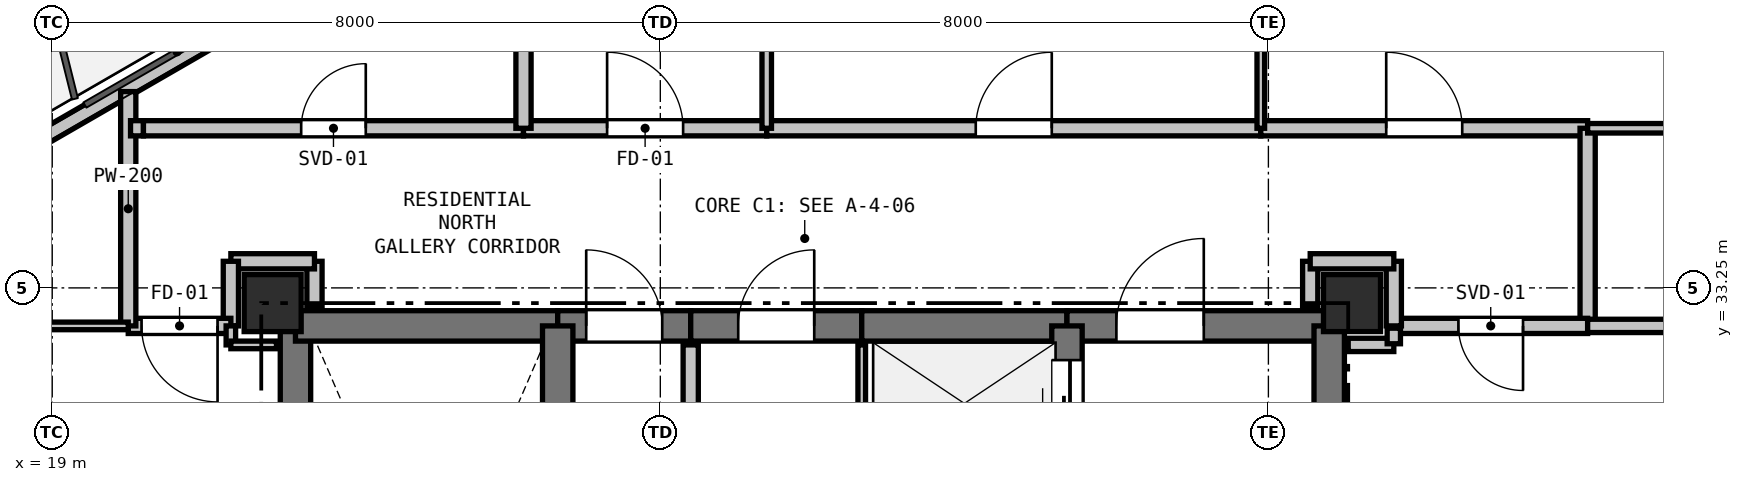
"""IFC4 building model, lengths in metres.
Left out: names, types, materials, properties, quantities, classifications, styles, units other than length and angle.
Written with IfcOpenShell. Run it as: python <this file> out.ifc"""

import sys

from ifc_helpers import new_model, si_unit, direction, frame, frame_2d, origin, origin_2d, place, context, subcontext, project, spatial, rectangle, extrude, element, fill, save


model = new_model("IFC4")
c1 = context("Model", 3, precision=1e-05, world=origin(), true_north=direction((0.0, 1.0)))
c2 = subcontext(c1, "Body", "Model", "MODEL_VIEW")
j1 = project(units=[si_unit("LENGTHUNIT", "METRE"), si_unit("PLANEANGLEUNIT", "RADIAN")], contexts=[c1])
p1 = place(None, origin())
s1 = spatial("IfcSite", under=j1, at=p1, CompositionType="ELEMENT")
p2 = place(p1, origin())
s2 = spatial("IfcBuilding", under=s1, at=p2, CompositionType="ELEMENT")
p3 = place(p2, frame((0.0, 0.0, 167.4)))
s3 = spatial("IfcBuildingStorey", under=s2, at=p3, CompositionType="ELEMENT", Elevation=167.4)
for number, where, z_axis, x_axis in (
    (1, (21.9, 33.05, 0.0), (0.0, 0.0, 1.0), (1.0, 0.0, 0.0)),
    (2, (36.1, 33.05, 0.0), (0.0, 0.0, 1.0), (1.0, 0.0, 0.0)),
):
    element("IfcColumn", number, at=place(p3, frame(where, z_axis=z_axis, x_axis=x_axis)), inside=s3, PredefinedType="COLUMN", context=c2, shape_type="SweptSolid", body=[
        extrude(rectangle(XDim=0.75, YDim=0.75, at=origin_2d()), origin(), (0.0, 0.0, 1.0), 3.3),
    ])
p4 = place(p3, frame((18.58, 35.056, 0.0), z_axis=(0.0, 0.0, 1.0), x_axis=(0.866026169916, 0.499998673018, 0.0)))
e3 = element("IfcWall", 3, at=p4, inside=s3, PredefinedType="PARAPET", context=c2, shape_type="SweptSolid", body=[
    extrude(rectangle(XDim=9.742, YDim=0.2, at=frame_2d((4.871, 0.0))), origin(), (0.0, 0.0, 1.0), 0.2),
])
p5 = place(p3, frame((22.2, 25.4, 0.0), z_axis=(0.0, 0.0, 1.0), x_axis=(0.0, 1.0, 0.0)))
e4 = element("IfcWall", 4, at=p5, inside=s3, PredefinedType="SHEAR", context=c2, shape_type="SweptSolid", body=[
    extrude(rectangle(XDim=7.35, YDim=0.4, at=frame_2d((3.675, 0.0))), origin(), (0.0, 0.0, 1.0), 3.02),
])
p6 = place(p3, frame((22.2, 32.75, 0.0), z_axis=(0.0, 0.0, 1.0), x_axis=(1.0, 0.0, 0.0)))
e5 = element("IfcWall", 5, at=p6, inside=s3, PredefinedType="SHEAR", context=c2, shape_type="SweptSolid", body=[
    extrude(rectangle(XDim=3.45, YDim=0.4, at=frame_2d((1.725, 0.0))), origin(), (0.0, 0.0, 1.0), 3.02),
])
p7 = place(p3, frame((25.65, 32.75, 0.0), z_axis=(0.0, 0.0, 1.0), x_axis=(1.0, 0.0, 0.0)))
e6 = element("IfcWall", 6, at=p7, inside=s3, PredefinedType="SHEAR", context=c2, shape_type="SweptSolid", body=[
    extrude(rectangle(XDim=1.75, YDim=0.4, at=frame_2d((0.875, 0.0))), origin(), (0.0, 0.0, 1.0), 3.02),
])
p8 = place(p7, frame((0.375, 0.0, 0.0)))
e7 = element("IfcOpeningElement", 7, at=p8, cuts=e6, PredefinedType="OPENING", context=c2, shape_type="SweptSolid", body=[
    extrude(rectangle(XDim=1.0, YDim=2.15, at=frame_2d((0.5, 1.075))), frame((0.0, 0.21, 0.0), z_axis=(0.0, -1.0, 0.0), x_axis=(1.0, 0.0, 0.0)), (0.0, 0.0, 1.0), 0.42),
])
p9 = place(p3, frame((27.4, 32.75, 0.0), z_axis=(0.0, 0.0, 1.0), x_axis=(1.0, 0.0, 0.0)))
e8 = element("IfcWall", 8, at=p9, inside=s3, PredefinedType="SHEAR", context=c2, shape_type="SweptSolid", body=[
    extrude(rectangle(XDim=2.25, YDim=0.4, at=frame_2d((1.125, 0.0))), origin(), (0.0, 0.0, 1.0), 3.02),
])
p10 = place(p9, frame((0.625, 0.0, 0.0)))
e9 = element("IfcOpeningElement", 9, at=p10, cuts=e8, PredefinedType="OPENING", context=c2, shape_type="SweptSolid", body=[
    extrude(rectangle(XDim=1.0, YDim=2.15, at=frame_2d((0.5, 1.075))), frame((0.0, 0.21, 0.0), z_axis=(0.0, -1.0, 0.0), x_axis=(1.0, 0.0, 0.0)), (0.0, 0.0, 1.0), 0.42),
])
p11 = place(p3, frame((29.65, 32.75, 0.0), z_axis=(0.0, 0.0, 1.0), x_axis=(1.0, 0.0, 0.0)))
e10 = element("IfcWall", 10, at=p11, inside=s3, PredefinedType="SHEAR", context=c2, shape_type="SweptSolid", body=[
    extrude(rectangle(XDim=2.7, YDim=0.4, at=frame_2d((1.35, 0.0))), origin(), (0.0, 0.0, 1.0), 3.02),
])
p12 = place(p3, frame((32.35, 32.75, 0.0), z_axis=(0.0, 0.0, 1.0), x_axis=(1.0, 0.0, 0.0)))
e11 = element("IfcWall", 11, at=p12, inside=s3, PredefinedType="SHEAR", context=c2, shape_type="SweptSolid", body=[
    extrude(rectangle(XDim=3.45, YDim=0.4, at=frame_2d((1.725, 0.0))), origin(), (0.0, 0.0, 1.0), 3.02),
])
p13 = place(p12, frame((0.65, 0.0, 0.0)))
e12 = element("IfcOpeningElement", 12, at=p13, cuts=e11, PredefinedType="OPENING", context=c2, shape_type="SweptSolid", body=[
    extrude(rectangle(XDim=1.15, YDim=2.15, at=frame_2d((0.575, 1.075))), frame((0.0, 0.21, 0.0), z_axis=(0.0, -1.0, 0.0), x_axis=(1.0, 0.0, 0.0)), (0.0, 0.0, 1.0), 0.42),
])
p14 = place(p3, frame((35.8, 32.75, 0.0), z_axis=(0.0, 0.0, 1.0), x_axis=(0.0, -1.0, 0.0)))
e13 = element("IfcWall", 13, at=p14, inside=s3, PredefinedType="SHEAR", context=c2, shape_type="SweptSolid", body=[
    extrude(rectangle(XDim=4.65, YDim=0.4, at=frame_2d((2.325, 0.0))), origin(), (0.0, 0.0, 1.0), 3.02),
])
p15 = place(p3, frame((25.65, 27.95, 0.0), z_axis=(0.0, 0.0, 1.0), x_axis=(0.0, 1.0, 0.0)))
e14 = element("IfcWall", 14, at=p15, inside=s3, PredefinedType="SHEAR", context=c2, shape_type="SweptSolid", body=[
    extrude(rectangle(XDim=4.8, YDim=0.4, at=frame_2d((2.4, 0.0))), origin(), (0.0, 0.0, 1.0), 3.02),
])
p16 = place(p3, frame((32.35, 30.75, 0.0), z_axis=(0.0, 0.0, 1.0), x_axis=(0.0, 1.0, 0.0)))
e15 = element("IfcWall", 15, at=p16, inside=s3, PredefinedType="SHEAR", context=c2, shape_type="SweptSolid", body=[
    extrude(rectangle(XDim=2.0, YDim=0.4, at=frame_2d((1.0, 0.0))), origin(), (0.0, 0.0, 1.0), 3.02),
])
p17 = place(p16, frame((0.45, 0.0, 0.0)))
e16 = element("IfcOpeningElement", 16, at=p17, cuts=e15, PredefinedType="OPENING", context=c2, shape_type="SweptSolid", body=[
    extrude(rectangle(XDim=1.1, YDim=2.15, at=frame_2d((0.55, 1.075))), frame((0.0, 0.21, 0.0), z_axis=(0.0, -1.0, 0.0), x_axis=(1.0, 0.0, 0.0)), (0.0, 0.0, 1.0), 0.42),
])
p18 = place(p3, frame((29.65, 30.3, 0.0), z_axis=(0.0, 0.0, 1.0), x_axis=(0.0, 1.0, 0.0)))
e17 = element("IfcWall", 17, at=p18, inside=s3, PredefinedType="PARTITIONING", context=c2, shape_type="SweptSolid", body=[
    extrude(rectangle(XDim=2.2, YDim=0.1, at=frame_2d((1.1, 0.0))), origin(), (0.0, 0.0, 1.0), 3.02),
])
p19 = place(p3, frame((27.4, 32.5, 0.0), z_axis=(0.0, 0.0, 1.0), x_axis=(0.0, -1.0, 0.0)))
e18 = element("IfcWall", 18, at=p19, inside=s3, PredefinedType="PARTITIONING", context=c2, shape_type="SweptSolid", body=[
    extrude(rectangle(XDim=4.55, YDim=0.2, at=frame_2d((2.275, 0.0))), origin(), (0.0, 0.0, 1.0), 3.02),
])
p20 = place(p19, frame((1.775, 0.0, 0.0)))
e19 = element("IfcOpeningElement", 19, at=p20, cuts=e18, PredefinedType="OPENING", context=c2, shape_type="SweptSolid", body=[
    extrude(rectangle(XDim=1.0, YDim=2.15, at=frame_2d((0.5, 1.075))), frame((0.0, 0.11, 0.0), z_axis=(0.0, -1.0, 0.0), x_axis=(1.0, 0.0, 0.0)), (0.0, 0.0, 1.0), 0.22),
])
for number, where, z_axis, x_axis in (
    (20, (35.55, 33.6, 0.0), (0.0, 0.0, 1.0), (0.0, -1.0, 0.0)),
    (21, (22.45, 33.0, 0.0), (0.0, 0.0, 1.0), (0.0, 1.0, 0.0)),
):
    element("IfcWall", number, at=place(p3, frame(where, z_axis=z_axis, x_axis=x_axis)), inside=s3, PredefinedType="PARTITIONING", context=c2, shape_type="SweptSolid", body=[
        extrude(rectangle(XDim=0.6, YDim=0.2, at=frame_2d((0.3, 0.0))), origin(), (0.0, 0.0, 1.0), 2.545),
    ])
p21 = place(p3, frame((22.45, 33.6, 0.0), z_axis=(0.0, 0.0, 1.0), x_axis=(-1.0, 0.0, 0.0)))
e22 = element("IfcWall", 22, at=p21, inside=s3, PredefinedType="PARTITIONING", context=c2, shape_type="SweptSolid", body=[
    extrude(rectangle(XDim=1.1, YDim=0.2, at=frame_2d((0.55, 0.0))), origin(), (0.0, 0.0, 1.0), 3.02),
])
p22 = place(p3, frame((21.35, 33.6, 0.0), z_axis=(0.0, 0.0, 1.0), x_axis=(0.0, -1.0, 0.0)))
e23 = element("IfcWall", 23, at=p22, inside=s3, PredefinedType="PARTITIONING", context=c2, shape_type="SweptSolid", body=[
    extrude(rectangle(XDim=0.85, YDim=0.2, at=frame_2d((0.425, 0.0))), origin(), (0.0, 0.0, 1.0), 2.469),
])
p23 = place(p3, frame((21.35, 32.75, 0.0), z_axis=(0.0, 0.0, 1.0), x_axis=(-1.0, 0.0, 0.0)))
e24 = element("IfcWall", 24, at=p23, inside=s3, PredefinedType="PARTITIONING", context=c2, shape_type="SweptSolid", body=[
    extrude(rectangle(XDim=1.35, YDim=0.2, at=frame_2d((0.675, 0.0))), origin(), (0.0, 0.0, 1.0), 2.469),
])
p24 = place(p23, frame((0.175, 0.0, 0.0)))
e25 = element("IfcOpeningElement", 25, at=p24, cuts=e24, PredefinedType="OPENING", context=c2, shape_type="SweptSolid", body=[
    extrude(rectangle(XDim=1.0, YDim=2.15, at=frame_2d((0.5, 1.075))), frame((0.0, 0.11, 0.0), z_axis=(0.0, -1.0, 0.0), x_axis=(1.0, 0.0, 0.0)), (0.0, 0.0, 1.0), 0.22),
])
p25 = place(p3, frame((20.0, 32.75, 0.0), z_axis=(0.0, 0.0, 1.0), x_axis=(0.0, 1.0, 0.0)))
e26 = element("IfcWall", 26, at=p25, inside=s3, PredefinedType="PARTITIONING", context=c2, shape_type="SweptSolid", body=[
    extrude(rectangle(XDim=3.083, YDim=0.2, at=frame_2d((1.541, 0.0))), origin(), (0.0, 0.0, 1.0), 2.365),
])
p26 = place(p3, frame((20.03, 35.35, 0.0), z_axis=(0.0, 0.0, 1.0), x_axis=(1.0, 0.0, 0.0)))
e27 = element("IfcWall", 27, at=p26, inside=s3, PredefinedType="PARTITIONING", context=c2, shape_type="SweptSolid", body=[
    extrude(rectangle(XDim=0.17, YDim=0.2, at=frame_2d((0.085, 0.0))), origin(), (0.0, 0.0, 1.0), 2.365),
])
p27 = place(p3, frame((20.2, 35.35, 0.0), z_axis=(0.0, 0.0, 1.0), x_axis=(1.0, 0.0, 0.0)))
e28 = element("IfcWall", 28, at=p27, inside=s3, PredefinedType="PARTITIONING", context=c2, shape_type="SweptSolid", body=[
    extrude(rectangle(XDim=5.0, YDim=0.2, at=frame_2d((2.5, 0.0))), origin(), (0.0, 0.0, 1.0), 2.365),
])
p28 = place(p27, frame((2.075, 0.0, 0.0)))
e29 = element("IfcOpeningElement", 29, at=p28, cuts=e28, PredefinedType="OPENING", context=c2, shape_type="SweptSolid", body=[
    extrude(rectangle(XDim=0.85, YDim=2.1, at=frame_2d((0.425, 1.05))), frame((0.0, 0.11, 0.0), z_axis=(0.0, -1.0, 0.0), x_axis=(1.0, 0.0, 0.0)), (0.0, 0.0, 1.0), 0.22),
])
p29 = place(p3, frame((25.2, 35.35, 0.0), z_axis=(0.0, 0.0, 1.0), x_axis=(1.0, 0.0, 0.0)))
e30 = element("IfcWall", 30, at=p29, inside=s3, PredefinedType="PARTITIONING", context=c2, shape_type="SweptSolid", body=[
    extrude(rectangle(XDim=3.2, YDim=0.2, at=frame_2d((1.6, 0.0))), origin(), (0.0, 0.0, 1.0), 3.02),
])
p30 = place(p29, frame((1.1, 0.0, 0.0)))
e31 = element("IfcOpeningElement", 31, at=p30, cuts=e30, PredefinedType="OPENING", context=c2, shape_type="SweptSolid", body=[
    extrude(rectangle(XDim=1.0, YDim=2.15, at=frame_2d((0.5, 1.075))), frame((0.0, 0.11, 0.0), z_axis=(0.0, -1.0, 0.0), x_axis=(1.0, 0.0, 0.0)), (0.0, 0.0, 1.0), 0.22),
])
p31 = place(p3, frame((28.4, 35.35, 0.0), z_axis=(0.0, 0.0, 1.0), x_axis=(1.0, 0.0, 0.0)))
e32 = element("IfcWall", 32, at=p31, inside=s3, PredefinedType="PARTITIONING", context=c2, shape_type="SweptSolid", body=[
    extrude(rectangle(XDim=6.5, YDim=0.2, at=frame_2d((3.25, 0.0))), origin(), (0.0, 0.0, 1.0), 3.02),
])
p32 = place(p31, frame((2.75, 0.0, 0.0)))
e33 = element("IfcOpeningElement", 33, at=p32, cuts=e32, PredefinedType="OPENING", context=c2, shape_type="SweptSolid", body=[
    extrude(rectangle(XDim=1.0, YDim=2.15, at=frame_2d((0.5, 1.075))), frame((0.0, 0.11, 0.0), z_axis=(0.0, -1.0, 0.0), x_axis=(1.0, 0.0, 0.0)), (0.0, 0.0, 1.0), 0.22),
])
p33 = place(p3, frame((34.9, 35.35, 0.0), z_axis=(0.0, 0.0, 1.0), x_axis=(1.0, 0.0, 0.0)))
e34 = element("IfcWall", 34, at=p33, inside=s3, PredefinedType="PARTITIONING", context=c2, shape_type="SweptSolid", body=[
    extrude(rectangle(XDim=4.3, YDim=0.2, at=frame_2d((2.15, 0.0))), origin(), (0.0, 0.0, 1.0), 2.469),
])
p34 = place(p33, frame((1.65, 0.0, 0.0)))
e35 = element("IfcOpeningElement", 35, at=p34, cuts=e34, PredefinedType="OPENING", context=c2, shape_type="SweptSolid", body=[
    extrude(rectangle(XDim=1.0, YDim=2.15, at=frame_2d((0.5, 1.075))), frame((0.0, 0.11, 0.0), z_axis=(0.0, -1.0, 0.0), x_axis=(1.0, 0.0, 0.0)), (0.0, 0.0, 1.0), 0.22),
])
p35 = place(p3, frame((39.2, 35.35, 0.0), z_axis=(0.0, 0.0, 1.0), x_axis=(0.0, -1.0, 0.0)))
e36 = element("IfcWall", 36, at=p35, inside=s3, PredefinedType="PARTITIONING", context=c2, shape_type="SweptSolid", body=[
    extrude(rectangle(XDim=2.6, YDim=0.2, at=frame_2d((1.3, 0.0))), origin(), (0.0, 0.0, 1.0), 3.02),
])
p36 = place(p3, frame((39.2, 32.75, 0.0), z_axis=(0.0, 0.0, 1.0), x_axis=(-1.0, 0.0, 0.0)))
e37 = element("IfcWall", 37, at=p36, inside=s3, PredefinedType="PARTITIONING", context=c2, shape_type="SweptSolid", body=[
    extrude(rectangle(XDim=2.55, YDim=0.2, at=frame_2d((1.275, 0.0))), origin(), (0.0, 0.0, 1.0), 3.02),
])
p37 = place(p36, frame((0.85, 0.0, 0.0)))
e38 = element("IfcOpeningElement", 38, at=p37, cuts=e37, PredefinedType="OPENING", context=c2, shape_type="SweptSolid", body=[
    extrude(rectangle(XDim=0.85, YDim=2.1, at=frame_2d((0.425, 1.05))), frame((0.0, 0.11, 0.0), z_axis=(0.0, -1.0, 0.0), x_axis=(1.0, 0.0, 0.0)), (0.0, 0.0, 1.0), 0.22),
])
p38 = place(p3, frame((36.65, 32.75, 0.0), z_axis=(0.0, 0.0, 1.0), x_axis=(0.0, 1.0, 0.0)))
e39 = element("IfcWall", 39, at=p38, inside=s3, PredefinedType="PARTITIONING", context=c2, shape_type="SweptSolid", body=[
    extrude(rectangle(XDim=0.85, YDim=0.2, at=frame_2d((0.425, 0.0))), origin(), (0.0, 0.0, 1.0), 2.469),
])
p39 = place(p3, frame((36.65, 33.6, 0.0), z_axis=(0.0, 0.0, 1.0), x_axis=(-1.0, 0.0, 0.0)))
e40 = element("IfcWall", 40, at=p39, inside=s3, PredefinedType="PARTITIONING", context=c2, shape_type="SweptSolid", body=[
    extrude(rectangle(XDim=1.1, YDim=0.2, at=frame_2d((0.55, 0.0))), origin(), (0.0, 0.0, 1.0), 2.469),
])
p40 = place(p3, frame((36.05, 32.5, 0.0), z_axis=(0.0, 0.0, 1.0), x_axis=(1.0, 0.0, 0.0)))
e41 = element("IfcWall", 41, at=p40, inside=s3, PredefinedType="PLUMBINGWALL", context=c2, shape_type="SweptSolid", body=[
    extrude(rectangle(XDim=0.6, YDim=0.175, at=frame_2d((0.3, 0.0))), origin(), (0.0, 0.0, 1.0), 2.545),
])
p41 = place(p3, frame((36.65, 32.515, 0.0), z_axis=(0.0, 0.0, 1.0), x_axis=(0.0, 1.0, 0.0)))
e42 = element("IfcWall", 42, at=p41, inside=s3, PredefinedType="PLUMBINGWALL", context=c2, shape_type="SweptSolid", body=[
    extrude(rectangle(XDim=0.205, YDim=0.175, at=frame_2d((0.103, 0.0))), origin(), (0.0, 0.0, 1.0), 3.02),
])
p42 = place(p3, frame((39.2, 32.75, 0.0), z_axis=(0.0, 0.0, 1.0), x_axis=(1.0, 0.0, 0.0)))
e43 = element("IfcWall", 43, at=p42, inside=s3, PredefinedType="PLUMBINGWALL", context=c2, shape_type="SweptSolid", body=[
    extrude(rectangle(XDim=1.9, YDim=0.175, at=frame_2d((0.95, 0.0))), origin(), (0.0, 0.0, 1.0), 2.365),
])
p43 = place(p3, frame((14.855, 32.75, 0.0), z_axis=(0.0, 0.0, 1.0), x_axis=(1.0, 0.0, 0.0)))
e44 = element("IfcWall", 44, at=p43, inside=s3, PredefinedType="PARTITIONING", context=c2, shape_type="SweptSolid", body=[
    extrude(rectangle(XDim=5.145, YDim=0.1, at=frame_2d((2.572, 0.0))), origin(), (0.0, 0.0, 1.0), 2.365),
])
p44 = place(p3, frame((21.35, 32.75, 0.0), z_axis=(0.0, 0.0, 1.0), x_axis=(0.0, -1.0, 0.0)))
e45 = element("IfcWall", 45, at=p44, inside=s3, PredefinedType="PARTITIONING", context=c2, shape_type="SweptSolid", body=[
    extrude(rectangle(XDim=0.25, YDim=0.125, at=frame_2d((0.125, 0.0))), origin(), (0.0, 0.0, 1.0), 3.02),
])
p45 = place(p3, frame((21.35, 32.5, 0.0), z_axis=(0.0, 0.0, 1.0), x_axis=(1.0, 0.0, 0.0)))
e46 = element("IfcWall", 46, at=p45, inside=s3, PredefinedType="PARTITIONING", context=c2, shape_type="SweptSolid", body=[
    extrude(rectangle(XDim=0.6, YDim=0.1, at=frame_2d((0.3, 0.0))), origin(), (0.0, 0.0, 1.0), 2.545),
])
p46 = place(p3, frame((25.2, 37.65, 0.0), z_axis=(0.0, 0.0, 1.0), x_axis=(0.0, -1.0, 0.0)))
e47 = element("IfcWall", 47, at=p46, inside=s3, PredefinedType="PARTITIONING", context=c2, shape_type="SweptSolid", body=[
    extrude(rectangle(XDim=2.3, YDim=0.2, at=frame_2d((1.15, 0.0))), origin(), (0.0, 0.0, 1.0), 3.02),
])
p47 = place(p3, frame((28.4, 40.375, 0.0), z_axis=(0.0, 0.0, 1.0), x_axis=(0.0, -1.0, 0.0)))
e48 = element("IfcWall", 48, at=p47, inside=s3, PredefinedType="PARTITIONING", context=c2, shape_type="SweptSolid", body=[
    extrude(rectangle(XDim=5.025, YDim=0.125, at=frame_2d((2.513, 0.0))), origin(), (0.0, 0.0, 1.0), 2.365),
])
p48 = place(p3, frame((34.9, 44.307, 0.0), z_axis=(0.0, 0.0, 1.0), x_axis=(0.0, -1.0, 0.0)))
e49 = element("IfcWall", 49, at=p48, inside=s3, PredefinedType="PARTITIONING", context=c2, shape_type="SweptSolid", body=[
    extrude(rectangle(XDim=8.957, YDim=0.1, at=frame_2d((4.479, 0.0))), origin(), (0.0, 0.0, 1.0), 2.685),
])
p49 = place(p3, frame((41.255, 35.35, 0.0), z_axis=(0.0, 0.0, 1.0), x_axis=(-1.0, 0.0, 0.0)))
e50 = element("IfcWall", 50, at=p49, inside=s3, PredefinedType="PARTITIONING", context=c2, shape_type="SweptSolid", body=[
    extrude(rectangle(XDim=2.055, YDim=0.125, at=frame_2d((1.027, 0.0))), origin(), (0.0, 0.0, 1.0), 2.365),
])
p50 = place(p8, origin())
e51 = element("IfcDoor", 51, at=p50, inside=s3, OperationType="SINGLE_SWING_LEFT", PredefinedType="DOOR", context=c2, shape_type="SweptSolid", body=[
    extrude(rectangle(XDim=1.0, YDim=2.15, at=frame_2d((0.5, 1.075))), frame((0.0, 0.025, 0.0), z_axis=(0.0, -1.0, 0.0), x_axis=(1.0, 0.0, 0.0)), (0.0, 0.0, 1.0), 0.05),
])
fill(e7, e51)
p51 = place(p17, origin())
e52 = element("IfcDoor", 52, at=p51, inside=s3, OperationType="SLIDING_TO_LEFT", PredefinedType="DOOR", context=c2, shape_type="SweptSolid", body=[
    extrude(rectangle(XDim=1.1, YDim=2.15, at=frame_2d((0.55, 1.075))), frame((0.0, 0.025, 0.0), z_axis=(0.0, -1.0, 0.0), x_axis=(1.0, 0.0, 0.0)), (0.0, 0.0, 1.0), 0.05),
])
fill(e16, e52)
p52 = place(p13, origin())
e53 = element("IfcDoor", 53, at=p52, inside=s3, OperationType="SINGLE_SWING_RIGHT", PredefinedType="DOOR", context=c2, shape_type="SweptSolid", body=[
    extrude(rectangle(XDim=1.15, YDim=2.15, at=frame_2d((0.575, 1.075))), frame((0.0, 0.025, 0.0), z_axis=(0.0, -1.0, 0.0), x_axis=(1.0, 0.0, 0.0)), (0.0, 0.0, 1.0), 0.05),
])
fill(e12, e53)
p53 = place(p37, origin())
e54 = element("IfcDoor", 54, at=p53, inside=s3, OperationType="SINGLE_SWING_LEFT", PredefinedType="DOOR", context=c2, shape_type="SweptSolid", body=[
    extrude(rectangle(XDim=0.85, YDim=2.1, at=frame_2d((0.425, 1.05))), frame((0.0, 0.025, 0.0), z_axis=(0.0, -1.0, 0.0), x_axis=(1.0, 0.0, 0.0)), (0.0, 0.0, 1.0), 0.05),
])
fill(e38, e54)
p54 = place(p10, origin())
e55 = element("IfcDoor", 55, at=p54, inside=s3, OperationType="SINGLE_SWING_RIGHT", PredefinedType="DOOR", context=c2, shape_type="SweptSolid", body=[
    extrude(rectangle(XDim=1.0, YDim=2.15, at=frame_2d((0.5, 1.075))), frame((0.0, 0.025, 0.0), z_axis=(0.0, -1.0, 0.0), x_axis=(1.0, 0.0, 0.0)), (0.0, 0.0, 1.0), 0.05),
])
fill(e9, e55)
p55 = place(p24, origin())
e56 = element("IfcDoor", 56, at=p55, inside=s3, OperationType="SINGLE_SWING_LEFT", PredefinedType="DOOR", context=c2, shape_type="SweptSolid", body=[
    extrude(rectangle(XDim=1.0, YDim=2.15, at=frame_2d((0.5, 1.075))), frame((0.0, 0.025, 0.0), z_axis=(0.0, -1.0, 0.0), x_axis=(1.0, 0.0, 0.0)), (0.0, 0.0, 1.0), 0.05),
])
fill(e25, e56)
p56 = place(p28, origin())
e57 = element("IfcDoor", 57, at=p56, inside=s3, OperationType="SINGLE_SWING_RIGHT", PredefinedType="DOOR", context=c2, shape_type="SweptSolid", body=[
    extrude(rectangle(XDim=0.85, YDim=2.1, at=frame_2d((0.425, 1.05))), frame((0.0, 0.025, 0.0), z_axis=(0.0, -1.0, 0.0), x_axis=(1.0, 0.0, 0.0)), (0.0, 0.0, 1.0), 0.05),
])
fill(e29, e57)
p57 = place(p30, origin())
e58 = element("IfcDoor", 58, at=p57, inside=s3, OperationType="SINGLE_SWING_LEFT", PredefinedType="DOOR", context=c2, shape_type="SweptSolid", body=[
    extrude(rectangle(XDim=1.0, YDim=2.15, at=frame_2d((0.5, 1.075))), frame((0.0, 0.025, 0.0), z_axis=(0.0, -1.0, 0.0), x_axis=(1.0, 0.0, 0.0)), (0.0, 0.0, 1.0), 0.05),
])
fill(e31, e58)
p58 = place(p32, origin())
e59 = element("IfcDoor", 59, at=p58, inside=s3, OperationType="SINGLE_SWING_RIGHT", PredefinedType="DOOR", context=c2, shape_type="SweptSolid", body=[
    extrude(rectangle(XDim=1.0, YDim=2.15, at=frame_2d((0.5, 1.075))), frame((0.0, 0.025, 0.0), z_axis=(0.0, -1.0, 0.0), x_axis=(1.0, 0.0, 0.0)), (0.0, 0.0, 1.0), 0.05),
])
fill(e33, e59)
p59 = place(p34, origin())
e60 = element("IfcDoor", 60, at=p59, inside=s3, OperationType="SINGLE_SWING_LEFT", PredefinedType="DOOR", context=c2, shape_type="SweptSolid", body=[
    extrude(rectangle(XDim=1.0, YDim=2.15, at=frame_2d((0.5, 1.075))), frame((0.0, 0.025, 0.0), z_axis=(0.0, -1.0, 0.0), x_axis=(1.0, 0.0, 0.0)), (0.0, 0.0, 1.0), 0.05),
])
fill(e35, e60)
save(model, sys.argv[1])
